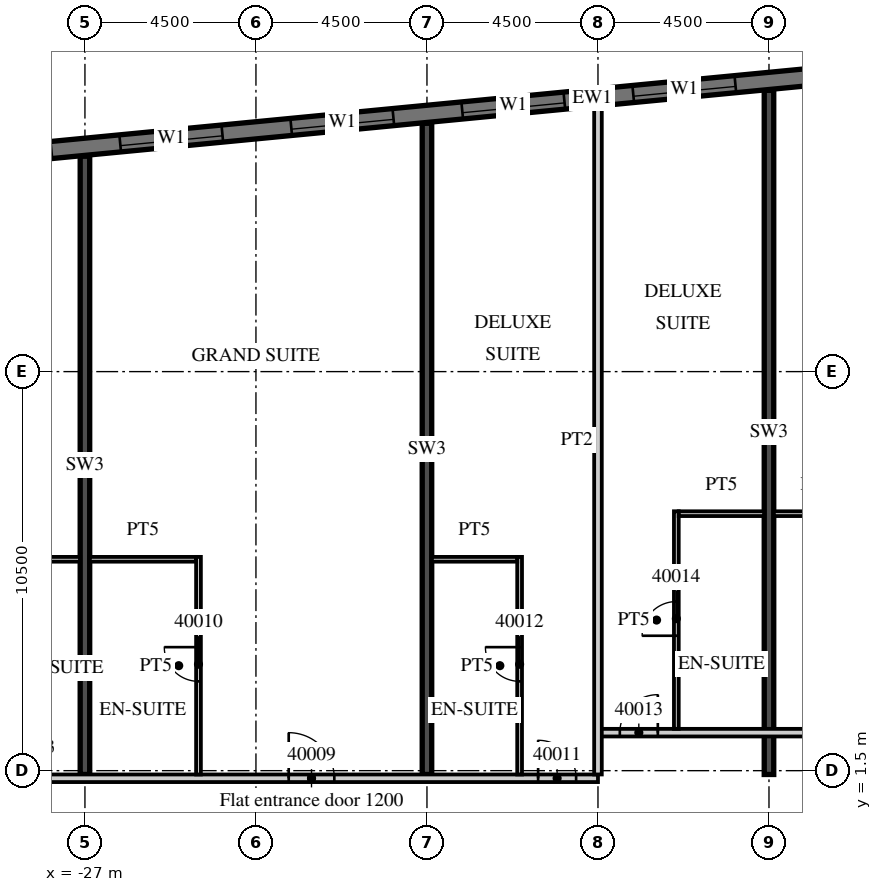
"""IFC4 building model, lengths in metres.
Left out: names, types, materials, properties, quantities, classifications, styles, units other than length and angle.
Written with IfcOpenShell. Run it as: python <this file> out.ifc"""

import sys

from ifc_helpers import new_model, si_unit, direction, frame, frame_2d, origin, place, context, subcontext, project, spatial, rectangle, extrude, element, fill, save


model = new_model("IFC4")
c1 = context("Model", 3, precision=1e-05, world=origin(), true_north=direction((0.0, 1.0)))
c2 = subcontext(c1, "Body", "Model", "MODEL_VIEW")
j1 = project(units=[si_unit("LENGTHUNIT", "METRE"), si_unit("PLANEANGLEUNIT", "RADIAN")], contexts=[c1])
p1 = place(None, origin())
s1 = spatial("IfcSite", under=j1, at=p1, CompositionType="ELEMENT")
p2 = place(p1, origin())
s2 = spatial("IfcBuilding", under=s1, at=p2, CompositionType="ELEMENT")
p3 = place(p2, frame((0.0, 0.0, 173.5)))
s3 = spatial("IfcBuildingStorey", under=s2, at=p3, CompositionType="ELEMENT", Elevation=173.5)
p4 = place(p3, frame((-27.0, 1.4, 0.0), z_axis=(0.0, 0.0, 1.0), x_axis=(0.0, 1.0, 0.0)))
e1 = element("IfcWall", 1, at=p4, inside=s3, PredefinedType="SHEAR", context=c2, shape_type="SweptSolid", body=[
    extrude(rectangle(XDim=16.268, YDim=0.25, at=frame_2d((8.134, 0.0))), origin(), (0.0, 0.0, 1.0), 3.3),
])
p5 = place(p3, frame((-18.0, 1.4, 0.0), z_axis=(0.0, 0.0, 1.0), x_axis=(0.0, 1.0, 0.0)))
e2 = element("IfcWall", 2, at=p5, inside=s3, PredefinedType="SHEAR", context=c2, shape_type="SweptSolid", body=[
    extrude(rectangle(XDim=17.134, YDim=0.25, at=frame_2d((8.567, 0.0))), origin(), (0.0, 0.0, 1.0), 3.3),
])
p6 = place(p3, frame((-9.0, 1.4, 0.0), z_axis=(0.0, 0.0, 1.0), x_axis=(0.0, 1.0, 0.0)))
e3 = element("IfcWall", 3, at=p6, inside=s3, PredefinedType="SHEAR", context=c2, shape_type="SweptSolid", body=[
    extrude(rectangle(XDim=18.001, YDim=0.25, at=frame_2d((9.0, 0.0))), origin(), (0.0, 0.0, 1.0), 3.3),
])
p7 = place(p3, frame((13.521, 21.817, 0.0), z_axis=(0.0, 0.0, 1.0), x_axis=(-0.995396508751, -0.095842529008, 0.0)))
e4 = element("IfcWall", 4, at=p7, inside=s3, PredefinedType="SOLIDWALL", context=c2, shape_type="SweptSolid", body=[
    extrude(rectangle(XDim=54.591, YDim=0.45, at=frame_2d((27.296, 0.0))), origin(), (0.0, 0.0, 1.0), 3.02),
])
p8 = place(p7, frame((0.91, 0.0, 0.45)))
e5 = element("IfcOpeningElement", 5, at=p8, cuts=e4, PredefinedType="OPENING", context=c2, shape_type="SweptSolid", body=[
    extrude(rectangle(XDim=2.7, YDim=2.25, at=frame_2d((1.35, 1.125))), frame((0.0, 0.235, 0.0), z_axis=(0.0, -1.0, 0.0), x_axis=(1.0, 0.0, 0.0)), (0.0, 0.0, 1.0), 0.47),
])
p9 = place(p7, frame((5.431, 0.0, 0.45)))
e6 = element("IfcOpeningElement", 6, at=p9, cuts=e4, PredefinedType="OPENING", context=c2, shape_type="SweptSolid", body=[
    extrude(rectangle(XDim=2.7, YDim=2.25, at=frame_2d((1.35, 1.125))), frame((0.0, 0.235, 0.0), z_axis=(0.0, -1.0, 0.0), x_axis=(1.0, 0.0, 0.0)), (0.0, 0.0, 1.0), 0.47),
])
p10 = place(p7, frame((9.952, 0.0, 0.45)))
e7 = element("IfcOpeningElement", 7, at=p10, cuts=e4, PredefinedType="OPENING", context=c2, shape_type="SweptSolid", body=[
    extrude(rectangle(XDim=2.7, YDim=2.25, at=frame_2d((1.35, 1.125))), frame((0.0, 0.235, 0.0), z_axis=(0.0, -1.0, 0.0), x_axis=(1.0, 0.0, 0.0)), (0.0, 0.0, 1.0), 0.47),
])
p11 = place(p7, frame((14.473, 0.0, 0.45)))
e8 = element("IfcOpeningElement", 8, at=p11, cuts=e4, PredefinedType="OPENING", context=c2, shape_type="SweptSolid", body=[
    extrude(rectangle(XDim=2.7, YDim=2.25, at=frame_2d((1.35, 1.125))), frame((0.0, 0.235, 0.0), z_axis=(0.0, -1.0, 0.0), x_axis=(1.0, 0.0, 0.0)), (0.0, 0.0, 1.0), 0.47),
])
p12 = place(p7, frame((18.994, 0.0, 0.45)))
e9 = element("IfcOpeningElement", 9, at=p12, cuts=e4, PredefinedType="OPENING", context=c2, shape_type="SweptSolid", body=[
    extrude(rectangle(XDim=2.7, YDim=2.25, at=frame_2d((1.35, 1.125))), frame((0.0, 0.235, 0.0), z_axis=(0.0, -1.0, 0.0), x_axis=(1.0, 0.0, 0.0)), (0.0, 0.0, 1.0), 0.47),
])
p13 = place(p7, frame((23.514, 0.0, 0.45)))
e10 = element("IfcOpeningElement", 10, at=p13, cuts=e4, PredefinedType="OPENING", context=c2, shape_type="SweptSolid", body=[
    extrude(rectangle(XDim=2.7, YDim=2.25, at=frame_2d((1.35, 1.125))), frame((0.0, 0.235, 0.0), z_axis=(0.0, -1.0, 0.0), x_axis=(1.0, 0.0, 0.0)), (0.0, 0.0, 1.0), 0.47),
])
p14 = place(p7, frame((28.035, 0.0, 0.45)))
e11 = element("IfcOpeningElement", 11, at=p14, cuts=e4, PredefinedType="OPENING", context=c2, shape_type="SweptSolid", body=[
    extrude(rectangle(XDim=2.7, YDim=2.25, at=frame_2d((1.35, 1.125))), frame((0.0, 0.235, 0.0), z_axis=(0.0, -1.0, 0.0), x_axis=(1.0, 0.0, 0.0)), (0.0, 0.0, 1.0), 0.47),
])
p15 = place(p7, frame((32.556, 0.0, 0.45)))
e12 = element("IfcOpeningElement", 12, at=p15, cuts=e4, PredefinedType="OPENING", context=c2, shape_type="SweptSolid", body=[
    extrude(rectangle(XDim=2.7, YDim=2.25, at=frame_2d((1.35, 1.125))), frame((0.0, 0.235, 0.0), z_axis=(0.0, -1.0, 0.0), x_axis=(1.0, 0.0, 0.0)), (0.0, 0.0, 1.0), 0.47),
])
p16 = place(p7, frame((37.077, 0.0, 0.45)))
e13 = element("IfcOpeningElement", 13, at=p16, cuts=e4, PredefinedType="OPENING", context=c2, shape_type="SweptSolid", body=[
    extrude(rectangle(XDim=2.7, YDim=2.25, at=frame_2d((1.35, 1.125))), frame((0.0, 0.235, 0.0), z_axis=(0.0, -1.0, 0.0), x_axis=(1.0, 0.0, 0.0)), (0.0, 0.0, 1.0), 0.47),
])
p17 = place(p7, frame((41.598, 0.0, 0.45)))
e14 = element("IfcOpeningElement", 14, at=p17, cuts=e4, PredefinedType="OPENING", context=c2, shape_type="SweptSolid", body=[
    extrude(rectangle(XDim=2.7, YDim=2.25, at=frame_2d((1.35, 1.125))), frame((0.0, 0.235, 0.0), z_axis=(0.0, -1.0, 0.0), x_axis=(1.0, 0.0, 0.0)), (0.0, 0.0, 1.0), 0.47),
])
p18 = place(p7, frame((46.118, 0.0, 0.45)))
e15 = element("IfcOpeningElement", 15, at=p18, cuts=e4, PredefinedType="OPENING", context=c2, shape_type="SweptSolid", body=[
    extrude(rectangle(XDim=2.7, YDim=2.25, at=frame_2d((1.35, 1.125))), frame((0.0, 0.235, 0.0), z_axis=(0.0, -1.0, 0.0), x_axis=(1.0, 0.0, 0.0)), (0.0, 0.0, 1.0), 0.47),
])
p19 = place(p7, frame((50.629, 0.0, 0.45)))
e16 = element("IfcOpeningElement", 16, at=p19, cuts=e4, PredefinedType="OPENING", context=c2, shape_type="SweptSolid", body=[
    extrude(rectangle(XDim=2.7, YDim=2.25, at=frame_2d((1.35, 1.125))), frame((0.0, 0.235, 0.0), z_axis=(0.0, -1.0, 0.0), x_axis=(1.0, 0.0, 0.0)), (0.0, 0.0, 1.0), 0.47),
])
p20 = place(p3, frame((-42.913, 1.3, 0.0), z_axis=(0.0, 0.0, 1.0), x_axis=(1.0, 0.0, 0.0)))
e17 = element("IfcWall", 17, at=p20, inside=s3, PredefinedType="PARTITIONING", context=c2, shape_type="SweptSolid", body=[
    extrude(rectangle(XDim=29.413, YDim=0.2, at=frame_2d((14.707, 0.0))), origin(), (0.0, 0.0, 1.0), 3.02),
])
p21 = place(p20, frame((0.15, 0.0, 0.0)))
e18 = element("IfcOpeningElement", 18, at=p21, cuts=e17, PredefinedType="OPENING", context=c2, shape_type="SweptSolid", body=[
    extrude(rectangle(XDim=0.9, YDim=2.1, at=frame_2d((0.45, 1.05))), frame((0.0, 0.11, 0.0), z_axis=(0.0, -1.0, 0.0), x_axis=(1.0, 0.0, 0.0)), (0.0, 0.0, 1.0), 0.22),
])
p22 = place(p20, frame((5.338, 0.0, 0.0)))
e19 = element("IfcOpeningElement", 19, at=p22, cuts=e17, PredefinedType="OPENING", context=c2, shape_type="SweptSolid", body=[
    extrude(rectangle(XDim=1.0, YDim=2.1, at=frame_2d((0.5, 1.05))), frame((0.0, 0.11, 0.0), z_axis=(0.0, -1.0, 0.0), x_axis=(1.0, 0.0, 0.0)), (0.0, 0.0, 1.0), 0.22),
])
p23 = place(p20, frame((7.488, 0.0, 0.0)))
e20 = element("IfcOpeningElement", 20, at=p23, cuts=e17, PredefinedType="OPENING", context=c2, shape_type="SweptSolid", body=[
    extrude(rectangle(XDim=1.0, YDim=2.1, at=frame_2d((0.5, 1.05))), frame((0.0, 0.11, 0.0), z_axis=(0.0, -1.0, 0.0), x_axis=(1.0, 0.0, 0.0)), (0.0, 0.0, 1.0), 0.22),
])
p24 = place(p20, frame((11.963, 0.0, 0.0)))
e21 = element("IfcOpeningElement", 21, at=p24, cuts=e17, PredefinedType="OPENING", context=c2, shape_type="SweptSolid", body=[
    extrude(rectangle(XDim=1.0, YDim=2.1, at=frame_2d((0.5, 1.05))), frame((0.0, 0.11, 0.0), z_axis=(0.0, -1.0, 0.0), x_axis=(1.0, 0.0, 0.0)), (0.0, 0.0, 1.0), 0.22),
])
p25 = place(p20, frame((21.275, 0.0, 0.0)))
e22 = element("IfcOpeningElement", 22, at=p25, cuts=e17, PredefinedType="OPENING", context=c2, shape_type="SweptSolid", body=[
    extrude(rectangle(XDim=1.2, YDim=2.1, at=frame_2d((0.6, 1.05))), frame((0.0, 0.11, 0.0), z_axis=(0.0, -1.0, 0.0), x_axis=(1.0, 0.0, 0.0)), (0.0, 0.0, 1.0), 0.22),
])
p26 = place(p20, frame((27.838, 0.0, 0.0)))
e23 = element("IfcOpeningElement", 23, at=p26, cuts=e17, PredefinedType="OPENING", context=c2, shape_type="SweptSolid", body=[
    extrude(rectangle(XDim=1.0, YDim=2.1, at=frame_2d((0.5, 1.05))), frame((0.0, 0.11, 0.0), z_axis=(0.0, -1.0, 0.0), x_axis=(1.0, 0.0, 0.0)), (0.0, 0.0, 1.0), 0.22),
])
p27 = place(p3, frame((-13.5, 2.5, 0.0), z_axis=(0.0, 0.0, 1.0), x_axis=(1.0, 0.0, 0.0)))
e24 = element("IfcWall", 24, at=p27, inside=s3, PredefinedType="PARTITIONING", context=c2, shape_type="SweptSolid", body=[
    extrude(rectangle(XDim=27.0, YDim=0.2, at=frame_2d((13.5, 0.0))), origin(), (0.0, 0.0, 1.0), 3.02),
])
p28 = place(p27, frame((0.575, 0.0, 0.0)))
e25 = element("IfcOpeningElement", 25, at=p28, cuts=e24, PredefinedType="OPENING", context=c2, shape_type="SweptSolid", body=[
    extrude(rectangle(XDim=1.0, YDim=2.1, at=frame_2d((0.5, 1.05))), frame((0.0, 0.11, 0.0), z_axis=(0.0, -1.0, 0.0), x_axis=(1.0, 0.0, 0.0)), (0.0, 0.0, 1.0), 0.22),
])
p29 = place(p27, frame((7.45, 0.0, 0.0)))
e26 = element("IfcOpeningElement", 26, at=p29, cuts=e24, PredefinedType="OPENING", context=c2, shape_type="SweptSolid", body=[
    extrude(rectangle(XDim=1.0, YDim=2.1, at=frame_2d((0.5, 1.05))), frame((0.0, 0.11, 0.0), z_axis=(0.0, -1.0, 0.0), x_axis=(1.0, 0.0, 0.0)), (0.0, 0.0, 1.0), 0.22),
])
p30 = place(p27, frame((11.925, 0.0, 0.0)))
e27 = element("IfcOpeningElement", 27, at=p30, cuts=e24, PredefinedType="OPENING", context=c2, shape_type="SweptSolid", body=[
    extrude(rectangle(XDim=1.0, YDim=2.1, at=frame_2d((0.5, 1.05))), frame((0.0, 0.11, 0.0), z_axis=(0.0, -1.0, 0.0), x_axis=(1.0, 0.0, 0.0)), (0.0, 0.0, 1.0), 0.22),
])
p31 = place(p27, frame((15.938, 0.0, 0.0)))
e28 = element("IfcOpeningElement", 28, at=p31, cuts=e24, PredefinedType="OPENING", context=c2, shape_type="SweptSolid", body=[
    extrude(rectangle(XDim=1.2, YDim=2.1, at=frame_2d((0.6, 1.05))), frame((0.0, 0.11, 0.0), z_axis=(0.0, -1.0, 0.0), x_axis=(1.0, 0.0, 0.0)), (0.0, 0.0, 1.0), 0.22),
])
p32 = place(p27, frame((25.425, 0.0, 0.0)))
e29 = element("IfcOpeningElement", 29, at=p32, cuts=e24, PredefinedType="OPENING", context=c2, shape_type="SweptSolid", body=[
    extrude(rectangle(XDim=1.0, YDim=2.1, at=frame_2d((0.5, 1.05))), frame((0.0, 0.11, 0.0), z_axis=(0.0, -1.0, 0.0), x_axis=(1.0, 0.0, 0.0)), (0.0, 0.0, 1.0), 0.22),
])
p33 = place(p3, frame((-29.375, 7.062, 0.0), z_axis=(0.0, 0.0, 1.0), x_axis=(1.0, 0.0, 0.0)))
e30 = element("IfcWall", 30, at=p33, inside=s3, PredefinedType="PARTITIONING", context=c2, shape_type="SweptSolid", body=[
    extrude(rectangle(XDim=2.25, YDim=0.125, at=frame_2d((1.125, 0.0))), origin(), (0.0, 0.0, 1.0), 3.02),
])
p34 = place(p3, frame((-24.012, 1.4, 0.0), z_axis=(0.0, 0.0, 1.0), x_axis=(0.0, 1.0, 0.0)))
e31 = element("IfcWall", 31, at=p34, inside=s3, PredefinedType="PARTITIONING", context=c2, shape_type="SweptSolid", body=[
    extrude(rectangle(XDim=5.725, YDim=0.125, at=frame_2d((2.863, 0.0))), origin(), (0.0, 0.0, 1.0), 3.02),
])
p35 = place(p34, frame((2.45, 0.0, 0.0)))
e32 = element("IfcOpeningElement", 32, at=p35, cuts=e31, PredefinedType="OPENING", context=c2, shape_type="SweptSolid", body=[
    extrude(rectangle(XDim=0.9, YDim=2.1, at=frame_2d((0.45, 1.05))), frame((0.0, 0.073, 0.0), z_axis=(0.0, -1.0, 0.0), x_axis=(1.0, 0.0, 0.0)), (0.0, 0.0, 1.0), 0.145),
])
p36 = place(p3, frame((-26.875, 7.062, 0.0), z_axis=(0.0, 0.0, 1.0), x_axis=(1.0, 0.0, 0.0)))
e33 = element("IfcWall", 33, at=p36, inside=s3, PredefinedType="PARTITIONING", context=c2, shape_type="SweptSolid", body=[
    extrude(rectangle(XDim=2.8, YDim=0.125, at=frame_2d((1.4, 0.0))), origin(), (0.0, 0.0, 1.0), 3.02),
])
p37 = place(p3, frame((-13.5, 1.4, 0.0), z_axis=(0.0, 0.0, 1.0), x_axis=(0.0, 1.0, 0.0)))
e34 = element("IfcWall", 34, at=p37, inside=s3, PredefinedType="PARTITIONING", context=c2, shape_type="SweptSolid", body=[
    extrude(rectangle(XDim=17.59, YDim=0.2, at=frame_2d((8.795, 0.0))), origin(), (0.0, 0.0, 1.0), 3.02),
])
p38 = place(p3, frame((-15.562, 1.4, 0.0), z_axis=(0.0, 0.0, 1.0), x_axis=(0.0, 1.0, 0.0)))
e35 = element("IfcWall", 35, at=p38, inside=s3, PredefinedType="PARTITIONING", context=c2, shape_type="SweptSolid", body=[
    extrude(rectangle(XDim=5.725, YDim=0.125, at=frame_2d((2.863, 0.0))), origin(), (0.0, 0.0, 1.0), 3.02),
])
p39 = place(p38, frame((2.45, 0.0, 0.0)))
e36 = element("IfcOpeningElement", 36, at=p39, cuts=e35, PredefinedType="OPENING", context=c2, shape_type="SweptSolid", body=[
    extrude(rectangle(XDim=0.9, YDim=2.1, at=frame_2d((0.45, 1.05))), frame((0.0, 0.073, 0.0), z_axis=(0.0, -1.0, 0.0), x_axis=(1.0, 0.0, 0.0)), (0.0, 0.0, 1.0), 0.145),
])
p40 = place(p3, frame((-17.875, 7.062, 0.0), z_axis=(0.0, 0.0, 1.0), x_axis=(1.0, 0.0, 0.0)))
e37 = element("IfcWall", 37, at=p40, inside=s3, PredefinedType="PARTITIONING", context=c2, shape_type="SweptSolid", body=[
    extrude(rectangle(XDim=2.25, YDim=0.125, at=frame_2d((1.125, 0.0))), origin(), (0.0, 0.0, 1.0), 3.02),
])
p41 = place(p3, frame((-11.438, 2.6, 0.0), z_axis=(0.0, 0.0, 1.0), x_axis=(0.0, 1.0, 0.0)))
e38 = element("IfcWall", 38, at=p41, inside=s3, PredefinedType="PARTITIONING", context=c2, shape_type="SweptSolid", body=[
    extrude(rectangle(XDim=5.725, YDim=0.125, at=frame_2d((2.862, 0.0))), origin(), (0.0, 0.0, 1.0), 3.02),
])
p42 = place(p41, frame((2.45, 0.0, 0.0)))
e39 = element("IfcOpeningElement", 39, at=p42, cuts=e38, PredefinedType="OPENING", context=c2, shape_type="SweptSolid", body=[
    extrude(rectangle(XDim=0.9, YDim=2.1, at=frame_2d((0.45, 1.05))), frame((0.0, 0.073, 0.0), z_axis=(0.0, -1.0, 0.0), x_axis=(1.0, 0.0, 0.0)), (0.0, 0.0, 1.0), 0.145),
])
for number, where, z_axis, x_axis in (
    (40, (-11.375, 8.262, 0.0), (0.0, 0.0, 1.0), (1.0, 0.0, 0.0)),
    (41, (-8.875, 8.262, 0.0), (0.0, 0.0, 1.0), (1.0, 0.0, 0.0)),
):
    element("IfcWall", number, at=place(p3, frame(where, z_axis=z_axis, x_axis=x_axis)), inside=s3, PredefinedType="PARTITIONING", context=c2, shape_type="SweptSolid", body=[
        extrude(rectangle(XDim=2.25, YDim=0.125, at=frame_2d((1.125, 0.0))), origin(), (0.0, 0.0, 1.0), 3.02),
    ])
p43 = place(p13, origin())
e42 = element("IfcWindow", 42, at=p43, inside=s3, PartitioningType="SINGLE_PANEL", PredefinedType="WINDOW", context=c2, shape_type="SweptSolid", body=[
    extrude(rectangle(XDim=2.7, YDim=2.25, at=frame_2d((1.35, 1.125))), frame((0.0, 0.09, 0.0), z_axis=(0.0, -1.0, 0.0), x_axis=(1.0, 0.0, 0.0)), (0.0, 0.0, 1.0), 0.06),
])
fill(e10, e42)
p44 = place(p14, origin())
e43 = element("IfcWindow", 43, at=p44, inside=s3, PartitioningType="SINGLE_PANEL", PredefinedType="WINDOW", context=c2, shape_type="SweptSolid", body=[
    extrude(rectangle(XDim=2.7, YDim=2.25, at=frame_2d((1.35, 1.125))), frame((0.0, 0.09, 0.0), z_axis=(0.0, -1.0, 0.0), x_axis=(1.0, 0.0, 0.0)), (0.0, 0.0, 1.0), 0.06),
])
fill(e11, e43)
p45 = place(p15, origin())
e44 = element("IfcWindow", 44, at=p45, inside=s3, PartitioningType="SINGLE_PANEL", PredefinedType="WINDOW", context=c2, shape_type="SweptSolid", body=[
    extrude(rectangle(XDim=2.7, YDim=2.25, at=frame_2d((1.35, 1.125))), frame((0.0, 0.09, 0.0), z_axis=(0.0, -1.0, 0.0), x_axis=(1.0, 0.0, 0.0)), (0.0, 0.0, 1.0), 0.06),
])
fill(e12, e44)
p46 = place(p16, origin())
e45 = element("IfcWindow", 45, at=p46, inside=s3, PartitioningType="SINGLE_PANEL", PredefinedType="WINDOW", context=c2, shape_type="SweptSolid", body=[
    extrude(rectangle(XDim=2.7, YDim=2.25, at=frame_2d((1.35, 1.125))), frame((0.0, 0.09, 0.0), z_axis=(0.0, -1.0, 0.0), x_axis=(1.0, 0.0, 0.0)), (0.0, 0.0, 1.0), 0.06),
])
fill(e13, e45)
p47 = place(p25, origin())
e46 = element("IfcDoor", 46, at=p47, inside=s3, OperationType="SINGLE_SWING_LEFT", PredefinedType="DOOR", context=c2, shape_type="SweptSolid", body=[
    extrude(rectangle(XDim=1.2, YDim=2.1, at=frame_2d((0.6, 1.05))), frame((0.0, 0.025, 0.0), z_axis=(0.0, -1.0, 0.0), x_axis=(1.0, 0.0, 0.0)), (0.0, 0.0, 1.0), 0.05),
])
fill(e22, e46)
p48 = place(p35, origin())
e47 = element("IfcDoor", 47, at=p48, inside=s3, OperationType="SINGLE_SWING_RIGHT", PredefinedType="DOOR", context=c2, shape_type="SweptSolid", body=[
    extrude(rectangle(XDim=0.9, YDim=2.1, at=frame_2d((0.45, 1.05))), frame((0.0, 0.025, 0.0), z_axis=(0.0, -1.0, 0.0), x_axis=(1.0, 0.0, 0.0)), (0.0, 0.0, 1.0), 0.05),
])
fill(e32, e47)
p49 = place(p26, origin())
e48 = element("IfcDoor", 48, at=p49, inside=s3, OperationType="SINGLE_SWING_LEFT", PredefinedType="DOOR", context=c2, shape_type="SweptSolid", body=[
    extrude(rectangle(XDim=1.0, YDim=2.1, at=frame_2d((0.5, 1.05))), frame((0.0, 0.025, 0.0), z_axis=(0.0, -1.0, 0.0), x_axis=(1.0, 0.0, 0.0)), (0.0, 0.0, 1.0), 0.05),
])
fill(e23, e48)
p50 = place(p39, origin())
e49 = element("IfcDoor", 49, at=p50, inside=s3, OperationType="SINGLE_SWING_RIGHT", PredefinedType="DOOR", context=c2, shape_type="SweptSolid", body=[
    extrude(rectangle(XDim=0.9, YDim=2.1, at=frame_2d((0.45, 1.05))), frame((0.0, 0.025, 0.0), z_axis=(0.0, -1.0, 0.0), x_axis=(1.0, 0.0, 0.0)), (0.0, 0.0, 1.0), 0.05),
])
fill(e36, e49)
p51 = place(p28, origin())
e50 = element("IfcDoor", 50, at=p51, inside=s3, OperationType="SINGLE_SWING_RIGHT", PredefinedType="DOOR", context=c2, shape_type="SweptSolid", body=[
    extrude(rectangle(XDim=1.0, YDim=2.1, at=frame_2d((0.5, 1.05))), frame((0.0, 0.025, 0.0), z_axis=(0.0, -1.0, 0.0), x_axis=(1.0, 0.0, 0.0)), (0.0, 0.0, 1.0), 0.05),
])
fill(e25, e50)
p52 = place(p42, origin())
e51 = element("IfcDoor", 51, at=p52, inside=s3, OperationType="SINGLE_SWING_LEFT", PredefinedType="DOOR", context=c2, shape_type="SweptSolid", body=[
    extrude(rectangle(XDim=0.9, YDim=2.1, at=frame_2d((0.45, 1.05))), frame((0.0, 0.025, 0.0), z_axis=(0.0, -1.0, 0.0), x_axis=(1.0, 0.0, 0.0)), (0.0, 0.0, 1.0), 0.05),
])
fill(e39, e51)
save(model, sys.argv[1])
